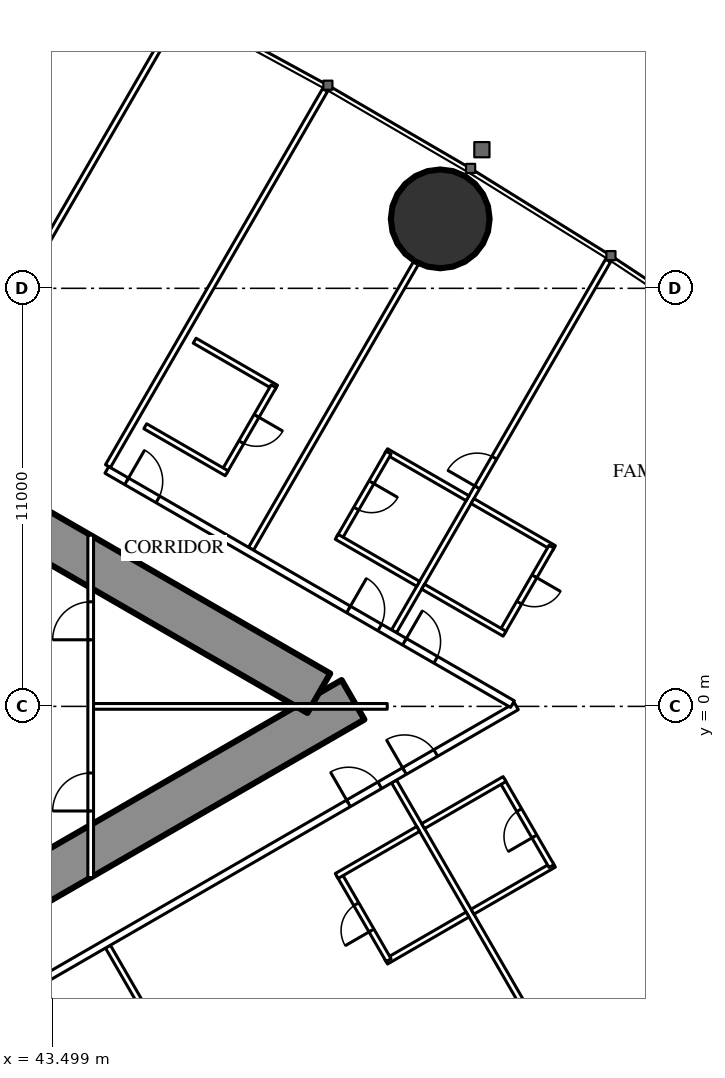
"""IFC4 building model, lengths in metres.
Left out: names, types, materials, properties, quantities, classifications, styles, units other than length and angle.
Written with IfcOpenShell. Run it as: python <this file> out.ifc"""

import sys

from ifc_helpers import new_model, si_unit, direction, frame, frame_2d, origin, origin_2d, place, context, subcontext, project, spatial, rectangle, hollow_circle, extrude, element, fill, save


model = new_model("IFC4")
c1 = context("Model", 3, precision=1e-05, world=origin(), true_north=direction((0.0, 1.0)))
c2 = subcontext(c1, "Body", "Model", "MODEL_VIEW")
j1 = project(units=[si_unit("LENGTHUNIT", "METRE"), si_unit("PLANEANGLEUNIT", "RADIAN")], contexts=[c1])
p1 = place(None, origin())
s1 = spatial("IfcSite", under=j1, at=p1, CompositionType="ELEMENT")
p2 = place(p1, origin())
s2 = spatial("IfcBuilding", under=s1, at=p2, CompositionType="ELEMENT")
p3 = place(p2, frame((0.0, 0.0, 111.6)))
s3 = spatial("IfcBuildingStorey", under=s2, at=p3, CompositionType="ELEMENT", Elevation=111.6)
p4 = place(p3, frame((53.697, 12.827, 0.0), z_axis=(0.0, 0.0, 1.0), x_axis=(1.0, 0.0, 0.0)))
e1 = element("IfcColumn", 1, at=p4, inside=s3, PredefinedType="COLUMN", context=c2, shape_type="SweptSolid", body=[
    extrude(hollow_circle(Radius=1.3, WallThickness=0.1, at=origin_2d()), origin(), (0.0, 0.0, 1.0), 3.5),
])
p5 = place(p3, frame((27.2, -13.8, 0.0), z_axis=(0.0, 0.0, 1.0), x_axis=(0.866027159892, 0.499996958321, 0.0)))
e2 = element("IfcWall", 2, at=p5, inside=s3, PredefinedType="SHEAR", context=c2, shape_type="SweptSolid", body=[
    extrude(rectangle(XDim=27.947, YDim=1.2, at=frame_2d((13.973, 0.0))), origin(), (0.0, 0.0, 1.0), 3.5),
])
p6 = place(p5, frame((4.6, 0.0, 0.0)))
e3 = element("IfcOpeningElement", 3, at=p6, cuts=e2, PredefinedType="OPENING", context=c2, shape_type="SweptSolid", body=[
    extrude(rectangle(XDim=1.0, YDim=2.2, at=frame_2d((0.5, 1.1))), frame((0.0, 0.61, 0.0), z_axis=(0.0, -1.0, 0.0), x_axis=(1.0, 0.0, 0.0)), (0.0, 0.0, 1.0), 1.22),
])
p7 = place(p5, frame((13.395, 0.0, 0.0)))
e4 = element("IfcOpeningElement", 4, at=p7, cuts=e2, PredefinedType="OPENING", context=c2, shape_type="SweptSolid", body=[
    extrude(rectangle(XDim=1.8, YDim=2.2, at=frame_2d((0.9, 1.1))), frame((0.0, 0.61, 0.0), z_axis=(0.0, -1.0, 0.0), x_axis=(1.0, 0.0, 0.0)), (0.0, 0.0, 1.0), 1.22),
])
p8 = place(p3, frame((27.2, 13.8, 0.0), z_axis=(0.0, 0.0, 1.0), x_axis=(0.866024515034, -0.500001539357, 0.0)))
e5 = element("IfcWall", 5, at=p8, inside=s3, PredefinedType="SHEAR", context=c2, shape_type="SweptSolid", body=[
    extrude(rectangle(XDim=26.907, YDim=1.2, at=frame_2d((13.454, 0.0))), origin(), (0.0, 0.0, 1.0), 3.5),
])
p9 = place(p8, frame((4.6, 0.0, 0.0)))
e6 = element("IfcOpeningElement", 6, at=p9, cuts=e5, PredefinedType="OPENING", context=c2, shape_type="SweptSolid", body=[
    extrude(rectangle(XDim=1.0, YDim=2.2, at=frame_2d((0.5, 1.1))), frame((0.0, 0.61, 0.0), z_axis=(0.0, -1.0, 0.0), x_axis=(1.0, 0.0, 0.0)), (0.0, 0.0, 1.0), 1.22),
])
p10 = place(p8, frame((13.395, 0.0, 0.0)))
e7 = element("IfcOpeningElement", 7, at=p10, cuts=e5, PredefinedType="OPENING", context=c2, shape_type="SweptSolid", body=[
    extrude(rectangle(XDim=1.8, YDim=2.2, at=frame_2d((0.9, 1.1))), frame((0.0, 0.61, 0.0), z_axis=(0.0, -1.0, 0.0), x_axis=(1.0, 0.0, 0.0)), (0.0, 0.0, 1.0), 1.22),
])
p11 = place(p3, frame((44.954, -6.321, 0.0), z_axis=(0.0, 0.0, 1.0), x_axis=(0.500018676722, -0.866014620505, 0.0)))
e8 = element("IfcWall", 8, at=p11, inside=s3, PredefinedType="PARTITIONING", context=c2, shape_type="SweptSolid", body=[
    extrude(rectangle(XDim=8.704, YDim=0.15, at=frame_2d((4.352, 0.0))), origin(), (0.0, 0.0, 1.0), 2.2),
])
p12 = place(p3, frame((52.481, -1.975, 0.0), z_axis=(0.0, 0.0, 1.0), x_axis=(0.500003867771, -0.866023170714, 0.0)))
e9 = element("IfcWall", 9, at=p12, inside=s3, PredefinedType="PARTITIONING", context=c2, shape_type="SweptSolid", body=[
    extrude(rectangle(XDim=11.265, YDim=0.15, at=frame_2d((5.632, 0.0))), origin(), (0.0, 0.0, 1.0), 3.25),
])
p13 = place(p3, frame((41.19, 8.494, 0.0), z_axis=(0.0, 0.0, 1.0), x_axis=(0.49999258054, 0.866029687369, 0.0)))
e10 = element("IfcWall", 10, at=p13, inside=s3, PredefinedType="PARTITIONING", context=c2, shape_type="SweptSolid", body=[
    extrude(rectangle(XDim=11.318, YDim=0.15, at=frame_2d((5.659, 0.0))), origin(), (0.0, 0.0, 1.0), 3.25),
])
p14 = place(p3, frame((44.954, 6.321, 0.0), z_axis=(0.0, 0.0, 1.0), x_axis=(0.500009815811, 0.866019736549, 0.0)))
e11 = element("IfcWall", 11, at=p14, inside=s3, PredefinedType="PARTITIONING", context=c2, shape_type="SweptSolid", body=[
    extrude(rectangle(XDim=11.424, YDim=0.15, at=frame_2d((5.712, 0.0))), origin(), (0.0, 0.0, 1.0), 3.25),
])
p15 = place(p3, frame((48.719, 4.147, 0.0), z_axis=(0.0, 0.0, 1.0), x_axis=(0.499993328235, 0.866029255696, 0.0)))
e12 = element("IfcWall", 12, at=p15, inside=s3, PredefinedType="PARTITIONING", context=c2, shape_type="SweptSolid", body=[
    extrude(rectangle(XDim=8.686, YDim=0.15, at=frame_2d((4.343, 0.0))), origin(), (0.0, 0.0, 1.0), 2.2),
])
p16 = place(p3, frame((52.481, 1.975, 0.0), z_axis=(0.0, 0.0, 1.0), x_axis=(0.500003867771, 0.866023170714, 0.0)))
e13 = element("IfcWall", 13, at=p16, inside=s3, PredefinedType="PARTITIONING", context=c2, shape_type="SweptSolid", body=[
    extrude(rectangle(XDim=11.265, YDim=0.15, at=frame_2d((5.632, 0.0))), origin(), (0.0, 0.0, 1.0), 3.25),
])
p17 = place(p16, frame((4.375, 0.0, 0.0)))
e14 = element("IfcOpeningElement", 14, at=p17, cuts=e13, PredefinedType="OPENING", context=c2, shape_type="SweptSolid", body=[
    extrude(rectangle(XDim=0.9, YDim=2.2, at=frame_2d((0.45, 1.1))), frame((0.0, 0.085, 0.0), z_axis=(0.0, -1.0, 0.0), x_axis=(1.0, 0.0, 0.0)), (0.0, 0.0, 1.0), 0.17),
])
p18 = place(p3, frame((37.96, -10.243, 0.0), z_axis=(0.0, 0.0, 1.0), x_axis=(0.866026429433, 0.499998223521, 0.0)))
e15 = element("IfcWall", 15, at=p18, inside=s3, PredefinedType="PARTITIONING", context=c2, shape_type="SweptSolid", body=[
    extrude(rectangle(XDim=20.487, YDim=0.2, at=frame_2d((10.243, 0.0))), origin(), (0.0, 0.0, 1.0), 3.25),
])
p19 = place(p18, frame((4.343, 0.0, 0.0)))
e16 = element("IfcOpeningElement", 16, at=p19, cuts=e15, PredefinedType="OPENING", context=c2, shape_type="SweptSolid", body=[
    extrude(rectangle(XDim=0.95, YDim=2.2, at=frame_2d((0.475, 1.1))), frame((0.0, 0.11, 0.0), z_axis=(0.0, -1.0, 0.0), x_axis=(1.0, 0.0, 0.0)), (0.0, 0.0, 1.0), 0.22),
])
p20 = place(p18, frame((15.385, 0.0, 0.0)))
e17 = element("IfcOpeningElement", 17, at=p20, cuts=e15, PredefinedType="OPENING", context=c2, shape_type="SweptSolid", body=[
    extrude(rectangle(XDim=0.95, YDim=2.2, at=frame_2d((0.475, 1.1))), frame((0.0, 0.11, 0.0), z_axis=(0.0, -1.0, 0.0), x_axis=(1.0, 0.0, 0.0)), (0.0, 0.0, 1.0), 0.22),
])
p21 = place(p18, frame((17.085, 0.0, 0.0)))
e18 = element("IfcOpeningElement", 18, at=p21, cuts=e15, PredefinedType="OPENING", context=c2, shape_type="SweptSolid", body=[
    extrude(rectangle(XDim=0.95, YDim=2.2, at=frame_2d((0.475, 1.1))), frame((0.0, 0.11, 0.0), z_axis=(0.0, -1.0, 0.0), x_axis=(1.0, 0.0, 0.0)), (0.0, 0.0, 1.0), 0.22),
])
p22 = place(p18, frame((1.048, 0.0, 0.0)))
e19 = element("IfcOpeningElement", 19, at=p22, cuts=e15, PredefinedType="OPENING", context=c2, shape_type="SweptSolid", body=[
    extrude(rectangle(XDim=1.8, YDim=2.2, at=frame_2d((0.9, 1.1))), frame((0.0, 0.11, 0.0), z_axis=(0.0, -1.0, 0.0), x_axis=(1.0, 0.0, 0.0)), (0.0, 0.0, 1.0), 0.22),
])
p23 = place(p3, frame((44.925, 6.222, 0.0), z_axis=(0.0, 0.0, 1.0), x_axis=(0.866025590081, -0.499999677325, 0.0)))
e20 = element("IfcWall", 20, at=p23, inside=s3, PredefinedType="PARTITIONING", context=c2, shape_type="SweptSolid", body=[
    extrude(rectangle(XDim=12.324, YDim=0.2, at=frame_2d((6.162, 0.0))), origin(), (0.0, 0.0, 1.0), 3.25),
])
p24 = place(p23, frame((9.042, 0.0, 0.0)))
e21 = element("IfcOpeningElement", 21, at=p24, cuts=e20, PredefinedType="OPENING", context=c2, shape_type="SweptSolid", body=[
    extrude(rectangle(XDim=0.95, YDim=2.2, at=frame_2d((0.475, 1.1))), frame((0.0, 0.11, 0.0), z_axis=(0.0, -1.0, 0.0), x_axis=(1.0, 0.0, 0.0)), (0.0, 0.0, 1.0), 0.22),
])
p25 = place(p23, frame((7.342, 0.0, 0.0)))
e22 = element("IfcOpeningElement", 22, at=p25, cuts=e20, PredefinedType="OPENING", context=c2, shape_type="SweptSolid", body=[
    extrude(rectangle(XDim=0.95, YDim=2.2, at=frame_2d((0.475, 1.1))), frame((0.0, 0.11, 0.0), z_axis=(0.0, -1.0, 0.0), x_axis=(1.0, 0.0, 0.0)), (0.0, 0.0, 1.0), 0.22),
])
p26 = place(p23, frame((0.6, 0.0, 0.0)))
e23 = element("IfcOpeningElement", 23, at=p26, cuts=e20, PredefinedType="OPENING", context=c2, shape_type="SweptSolid", body=[
    extrude(rectangle(XDim=0.95, YDim=2.2, at=frame_2d((0.475, 1.1))), frame((0.0, 0.11, 0.0), z_axis=(0.0, -1.0, 0.0), x_axis=(1.0, 0.0, 0.0)), (0.0, 0.0, 1.0), 0.22),
])
p27 = place(p3, frame((42.81, -7.559, 0.0), z_axis=(0.0, 0.0, 1.0), x_axis=(0.499936506574, -0.866062058628, 0.0)))
e24 = element("IfcWall", 24, at=p27, inside=s3, PredefinedType="PARTITIONING", context=c2, shape_type="SweptSolid", body=[
    extrude(rectangle(XDim=2.6, YDim=0.15, at=frame_2d((1.3, 0.0))), origin(), (0.0, 0.0, 1.0), 3.25),
])
p28 = place(p27, frame((0.9, 0.0, 0.0)))
e25 = element("IfcOpeningElement", 25, at=p28, cuts=e24, PredefinedType="OPENING", context=c2, shape_type="SweptSolid", body=[
    extrude(rectangle(XDim=0.8, YDim=2.2, at=frame_2d((0.4, 1.1))), frame((0.0, 0.085, 0.0), z_axis=(0.0, -1.0, 0.0), x_axis=(1.0, 0.0, 0.0)), (0.0, 0.0, 1.0), 0.17),
])
p29 = place(p3, frame((52.273, -6.714, 0.0), z_axis=(0.0, 0.0, 1.0), x_axis=(0.866031185235, 0.4999899861, 0.0)))
e26 = element("IfcWall", 26, at=p29, inside=s3, PredefinedType="PARTITIONING", context=c2, shape_type="SweptSolid", body=[
    extrude(rectangle(XDim=2.475, YDim=0.15, at=frame_2d((1.238, 0.0))), origin(), (0.0, 0.0, 1.0), 3.25),
])
p30 = place(p3, frame((51.038, -4.425, 0.0), z_axis=(0.0, 0.0, 1.0), x_axis=(0.49997716683, -0.86603858612, 0.0)))
e27 = element("IfcWall", 27, at=p30, inside=s3, PredefinedType="PARTITIONING", context=c2, shape_type="SweptSolid", body=[
    extrude(rectangle(XDim=2.6, YDim=0.15, at=frame_2d((1.3, 0.0))), origin(), (0.0, 0.0, 1.0), 3.25),
])
p31 = place(p30, frame((0.9, 0.0, 0.0)))
e28 = element("IfcOpeningElement", 28, at=p31, cuts=e27, PredefinedType="OPENING", context=c2, shape_type="SweptSolid", body=[
    extrude(rectangle(XDim=0.8, YDim=2.2, at=frame_2d((0.4, 1.1))), frame((0.0, 0.085, 0.0), z_axis=(0.0, -1.0, 0.0), x_axis=(1.0, 0.0, 0.0)), (0.0, 0.0, 1.0), 0.17),
])
p32 = place(p3, frame((50.973, -4.462, 0.0), z_axis=(0.0, 0.0, 1.0), x_axis=(0.866031185235, 0.4999899861, 0.0)))
e29 = element("IfcWall", 29, at=p32, inside=s3, PredefinedType="PARTITIONING", context=c2, shape_type="SweptSolid", body=[
    extrude(rectangle(XDim=2.475, YDim=0.15, at=frame_2d((1.238, 0.0))), origin(), (0.0, 0.0, 1.0), 3.25),
])
p33 = place(p3, frame((54.546, -5.402, 0.0), z_axis=(0.0, 0.0, 1.0), x_axis=(0.866006523861, 0.500032699561, 0.0)))
e30 = element("IfcWall", 30, at=p33, inside=s3, PredefinedType="PARTITIONING", context=c2, shape_type="SweptSolid", body=[
    extrude(rectangle(XDim=2.475, YDim=0.15, at=frame_2d((1.237, 0.0))), origin(), (0.0, 0.0, 1.0), 3.25),
])
p34 = place(p3, frame((55.325, -1.95, 0.0), z_axis=(0.0, 0.0, 1.0), x_axis=(0.500006934395, -0.866021400173, 0.0)))
e31 = element("IfcWall", 31, at=p34, inside=s3, PredefinedType="PARTITIONING", context=c2, shape_type="SweptSolid", body=[
    extrude(rectangle(XDim=2.6, YDim=0.15, at=frame_2d((1.3, 0.0))), origin(), (0.0, 0.0, 1.0), 3.25),
])
p35 = place(p34, frame((0.9, 0.0, 0.0)))
e32 = element("IfcOpeningElement", 32, at=p35, cuts=e31, PredefinedType="OPENING", context=c2, shape_type="SweptSolid", body=[
    extrude(rectangle(XDim=0.8, YDim=2.2, at=frame_2d((0.4, 1.1))), frame((0.0, 0.085, 0.0), z_axis=(0.0, -1.0, 0.0), x_axis=(1.0, 0.0, 0.0)), (0.0, 0.0, 1.0), 0.17),
])
for number, where, z_axis, x_axis in (
    (33, (53.246, -3.15, 0.0), (0.0, 0.0, 1.0), (0.866, 0.5, 0.0)),
    (34, (54.546, 5.402, 0.0), (0.0, 0.0, 1.0), (0.866, -0.5, 0.0)),
):
    element("IfcWall", number, at=place(p3, frame(where, z_axis=z_axis, x_axis=x_axis)), inside=s3, PredefinedType="PARTITIONING", context=c2, shape_type="SweptSolid", body=[
        extrude(rectangle(XDim=2.475, YDim=0.15, at=frame_2d((1.237, 0.0))), origin(), (0.0, 0.0, 1.0), 3.25),
    ])
p36 = place(p3, frame((55.325, 1.95, 0.0), z_axis=(0.0, 0.0, 1.0), x_axis=(0.500006934395, 0.866021400173, 0.0)))
e35 = element("IfcWall", 35, at=p36, inside=s3, PredefinedType="PARTITIONING", context=c2, shape_type="SweptSolid", body=[
    extrude(rectangle(XDim=2.6, YDim=0.15, at=frame_2d((1.3, 0.0))), origin(), (0.0, 0.0, 1.0), 3.25),
])
p37 = place(p36, frame((0.9, 0.0, 0.0)))
e36 = element("IfcOpeningElement", 36, at=p37, cuts=e35, PredefinedType="OPENING", context=c2, shape_type="SweptSolid", body=[
    extrude(rectangle(XDim=0.8, YDim=2.2, at=frame_2d((0.4, 1.1))), frame((0.0, 0.085, 0.0), z_axis=(0.0, -1.0, 0.0), x_axis=(1.0, 0.0, 0.0)), (0.0, 0.0, 1.0), 0.17),
])
p38 = place(p3, frame((53.246, 3.15, 0.0), z_axis=(0.0, 0.0, 1.0), x_axis=(0.866006523861, -0.500032699561, 0.0)))
e37 = element("IfcWall", 37, at=p38, inside=s3, PredefinedType="PARTITIONING", context=c2, shape_type="SweptSolid", body=[
    extrude(rectangle(XDim=2.475, YDim=0.15, at=frame_2d((1.237, 0.0))), origin(), (0.0, 0.0, 1.0), 3.25),
])
p39 = place(p3, frame((52.273, 6.714, 0.0), z_axis=(0.0, 0.0, 1.0), x_axis=(0.866031185235, -0.4999899861, 0.0)))
e38 = element("IfcWall", 38, at=p39, inside=s3, PredefinedType="PARTITIONING", context=c2, shape_type="SweptSolid", body=[
    extrude(rectangle(XDim=2.475, YDim=0.15, at=frame_2d((1.238, 0.0))), origin(), (0.0, 0.0, 1.0), 3.25),
])
p40 = place(p3, frame((51.038, 4.425, 0.0), z_axis=(0.0, 0.0, 1.0), x_axis=(0.49997716683, 0.86603858612, 0.0)))
e39 = element("IfcWall", 39, at=p40, inside=s3, PredefinedType="PARTITIONING", context=c2, shape_type="SweptSolid", body=[
    extrude(rectangle(XDim=2.6, YDim=0.15, at=frame_2d((1.3, 0.0))), origin(), (0.0, 0.0, 1.0), 3.25),
])
p41 = place(p40, frame((0.9, 0.0, 0.0)))
e40 = element("IfcOpeningElement", 40, at=p41, cuts=e39, PredefinedType="OPENING", context=c2, shape_type="SweptSolid", body=[
    extrude(rectangle(XDim=0.8, YDim=2.2, at=frame_2d((0.4, 1.1))), frame((0.0, 0.085, 0.0), z_axis=(0.0, -1.0, 0.0), x_axis=(1.0, 0.0, 0.0)), (0.0, 0.0, 1.0), 0.17),
])
p42 = place(p3, frame((50.973, 4.462, 0.0), z_axis=(0.0, 0.0, 1.0), x_axis=(0.866031185235, -0.4999899861, 0.0)))
e41 = element("IfcWall", 41, at=p42, inside=s3, PredefinedType="PARTITIONING", context=c2, shape_type="SweptSolid", body=[
    extrude(rectangle(XDim=2.475, YDim=0.15, at=frame_2d((1.238, 0.0))), origin(), (0.0, 0.0, 1.0), 3.25),
])
p43 = place(p3, frame((47.235, 9.623, 0.0), z_axis=(0.0, 0.0, 1.0), x_axis=(0.866006523861, -0.500032699561, 0.0)))
e42 = element("IfcWall", 42, at=p43, inside=s3, PredefinedType="PARTITIONING", context=c2, shape_type="SweptSolid", body=[
    extrude(rectangle(XDim=2.475, YDim=0.15, at=frame_2d((1.237, 0.0))), origin(), (0.0, 0.0, 1.0), 3.25),
])
p44 = place(p3, frame((48.013, 6.171, 0.0), z_axis=(0.0, 0.0, 1.0), x_axis=(0.500006934395, 0.866021400173, 0.0)))
e43 = element("IfcWall", 43, at=p44, inside=s3, PredefinedType="PARTITIONING", context=c2, shape_type="SweptSolid", body=[
    extrude(rectangle(XDim=2.6, YDim=0.15, at=frame_2d((1.3, 0.0))), origin(), (0.0, 0.0, 1.0), 3.25),
])
p45 = place(p44, frame((0.9, 0.0, 0.0)))
e44 = element("IfcOpeningElement", 44, at=p45, cuts=e43, PredefinedType="OPENING", context=c2, shape_type="SweptSolid", body=[
    extrude(rectangle(XDim=0.8, YDim=2.2, at=frame_2d((0.4, 1.1))), frame((0.0, 0.085, 0.0), z_axis=(0.0, -1.0, 0.0), x_axis=(1.0, 0.0, 0.0)), (0.0, 0.0, 1.0), 0.17),
])
p46 = place(p3, frame((45.935, 7.371, 0.0), z_axis=(0.0, 0.0, 1.0), x_axis=(0.866031185235, -0.4999899861, 0.0)))
e45 = element("IfcWall", 45, at=p46, inside=s3, PredefinedType="PARTITIONING", context=c2, shape_type="SweptSolid", body=[
    extrude(rectangle(XDim=2.475, YDim=0.15, at=frame_2d((1.238, 0.0))), origin(), (0.0, 0.0, 1.0), 3.25),
])
p47 = place(p3, frame((44.5, -4.505, 0.0), z_axis=(0.0, 0.0, 1.0), x_axis=(0.0, 1.0, 0.0)))
e46 = element("IfcWall", 46, at=p47, inside=s3, PredefinedType="PARTITIONING", context=c2, shape_type="SweptSolid", body=[
    extrude(rectangle(XDim=9.009, YDim=0.15, at=frame_2d((4.505, 0.0))), origin(), (0.0, 0.0, 1.0), 2.45),
])
p48 = place(p47, frame((1.752, 0.0, 0.0)))
e47 = element("IfcOpeningElement", 47, at=p48, cuts=e46, PredefinedType="OPENING", context=c2, shape_type="SweptSolid", body=[
    extrude(rectangle(XDim=1.0, YDim=2.2, at=frame_2d((0.5, 1.1))), frame((0.0, 0.085, 0.0), z_axis=(0.0, -1.0, 0.0), x_axis=(1.0, 0.0, 0.0)), (0.0, 0.0, 1.0), 0.17),
])
p49 = place(p47, frame((6.257, 0.0, 0.0)))
e48 = element("IfcOpeningElement", 48, at=p49, cuts=e46, PredefinedType="OPENING", context=c2, shape_type="SweptSolid", body=[
    extrude(rectangle(XDim=1.0, YDim=2.2, at=frame_2d((0.5, 1.1))), frame((0.0, 0.085, 0.0), z_axis=(0.0, -1.0, 0.0), x_axis=(1.0, 0.0, 0.0)), (0.0, 0.0, 1.0), 0.17),
])
p50 = place(p3, frame((44.575, 0.0, 0.0), z_axis=(0.0, 0.0, 1.0), x_axis=(1.0, 0.0, 0.0)))
e49 = element("IfcWall", 49, at=p50, inside=s3, PredefinedType="PARTITIONING", context=c2, shape_type="SweptSolid", body=[
    extrude(rectangle(XDim=7.727, YDim=0.15, at=frame_2d((3.864, 0.0))), origin(), (0.0, 0.0, 1.0), 2.2),
])
p51 = place(p31, origin())
e50 = element("IfcDoor", 50, at=p51, inside=s3, OperationType="SINGLE_SWING_RIGHT", PredefinedType="DOOR", context=c2, shape_type="SweptSolid", body=[
    extrude(rectangle(XDim=0.8, YDim=2.2, at=frame_2d((0.4, 1.1))), frame((0.0, 0.025, 0.0), z_axis=(0.0, -1.0, 0.0), x_axis=(1.0, 0.0, 0.0)), (0.0, 0.0, 1.0), 0.05),
])
fill(e28, e50)
p52 = place(p20, origin())
e51 = element("IfcDoor", 51, at=p52, inside=s3, OperationType="SINGLE_SWING_LEFT", PredefinedType="DOOR", context=c2, shape_type="SweptSolid", body=[
    extrude(rectangle(XDim=0.95, YDim=2.2, at=frame_2d((0.475, 1.1))), frame((0.0, 0.025, 0.0), z_axis=(0.0, -1.0, 0.0), x_axis=(1.0, 0.0, 0.0)), (0.0, 0.0, 1.0), 0.05),
])
fill(e17, e51)
p53 = place(p35, origin())
e52 = element("IfcDoor", 52, at=p53, inside=s3, OperationType="SINGLE_SWING_RIGHT", PredefinedType="DOOR", context=c2, shape_type="SweptSolid", body=[
    extrude(rectangle(XDim=0.8, YDim=2.2, at=frame_2d((0.4, 1.1))), frame((0.0, 0.025, 0.0), z_axis=(0.0, -1.0, 0.0), x_axis=(1.0, 0.0, 0.0)), (0.0, 0.0, 1.0), 0.05),
])
fill(e32, e52)
p54 = place(p21, origin())
e53 = element("IfcDoor", 53, at=p54, inside=s3, OperationType="SINGLE_SWING_LEFT", PredefinedType="DOOR", context=c2, shape_type="SweptSolid", body=[
    extrude(rectangle(XDim=0.95, YDim=2.2, at=frame_2d((0.475, 1.1))), frame((0.0, 0.025, 0.0), z_axis=(0.0, -1.0, 0.0), x_axis=(1.0, 0.0, 0.0)), (0.0, 0.0, 1.0), 0.05),
])
fill(e18, e53)
p55 = place(p37, origin())
e54 = element("IfcDoor", 54, at=p55, inside=s3, OperationType="SINGLE_SWING_RIGHT", PredefinedType="DOOR", context=c2, shape_type="SweptSolid", body=[
    extrude(rectangle(XDim=0.8, YDim=2.2, at=frame_2d((0.4, 1.1))), frame((0.0, 0.025, 0.0), z_axis=(0.0, -1.0, 0.0), x_axis=(1.0, 0.0, 0.0)), (0.0, 0.0, 1.0), 0.05),
])
fill(e36, e54)
p56 = place(p24, origin())
e55 = element("IfcDoor", 55, at=p56, inside=s3, OperationType="SINGLE_SWING_LEFT", PredefinedType="DOOR", context=c2, shape_type="SweptSolid", body=[
    extrude(rectangle(XDim=0.95, YDim=2.2, at=frame_2d((0.475, 1.1))), frame((0.0, 0.025, 0.0), z_axis=(0.0, -1.0, 0.0), x_axis=(1.0, 0.0, 0.0)), (0.0, 0.0, 1.0), 0.05),
])
fill(e21, e55)
p57 = place(p41, origin())
e56 = element("IfcDoor", 56, at=p57, inside=s3, OperationType="SINGLE_SWING_RIGHT", PredefinedType="DOOR", context=c2, shape_type="SweptSolid", body=[
    extrude(rectangle(XDim=0.8, YDim=2.2, at=frame_2d((0.4, 1.1))), frame((0.0, 0.025, 0.0), z_axis=(0.0, -1.0, 0.0), x_axis=(1.0, 0.0, 0.0)), (0.0, 0.0, 1.0), 0.05),
])
fill(e40, e56)
p58 = place(p25, origin())
e57 = element("IfcDoor", 57, at=p58, inside=s3, OperationType="SINGLE_SWING_LEFT", PredefinedType="DOOR", context=c2, shape_type="SweptSolid", body=[
    extrude(rectangle(XDim=0.95, YDim=2.2, at=frame_2d((0.475, 1.1))), frame((0.0, 0.025, 0.0), z_axis=(0.0, -1.0, 0.0), x_axis=(1.0, 0.0, 0.0)), (0.0, 0.0, 1.0), 0.05),
])
fill(e22, e57)
p59 = place(p45, origin())
e58 = element("IfcDoor", 58, at=p59, inside=s3, OperationType="SINGLE_SWING_RIGHT", PredefinedType="DOOR", context=c2, shape_type="SweptSolid", body=[
    extrude(rectangle(XDim=0.8, YDim=2.2, at=frame_2d((0.4, 1.1))), frame((0.0, 0.025, 0.0), z_axis=(0.0, -1.0, 0.0), x_axis=(1.0, 0.0, 0.0)), (0.0, 0.0, 1.0), 0.05),
])
fill(e44, e58)
p60 = place(p26, origin())
e59 = element("IfcDoor", 59, at=p60, inside=s3, OperationType="SINGLE_SWING_LEFT", PredefinedType="DOOR", context=c2, shape_type="SweptSolid", body=[
    extrude(rectangle(XDim=0.95, YDim=2.2, at=frame_2d((0.475, 1.1))), frame((0.0, 0.025, 0.0), z_axis=(0.0, -1.0, 0.0), x_axis=(1.0, 0.0, 0.0)), (0.0, 0.0, 1.0), 0.05),
])
fill(e23, e59)
p61 = place(p17, origin())
e60 = element("IfcDoor", 60, at=p61, inside=s3, OperationType="SINGLE_SWING_LEFT", PredefinedType="DOOR", context=c2, shape_type="SweptSolid", body=[
    extrude(rectangle(XDim=0.9, YDim=2.2, at=frame_2d((0.45, 1.1))), frame((0.0, 0.025, 0.0), z_axis=(0.0, -1.0, 0.0), x_axis=(1.0, 0.0, 0.0)), (0.0, 0.0, 1.0), 0.05),
])
fill(e14, e60)
p62 = place(p48, origin())
e61 = element("IfcDoor", 61, at=p62, inside=s3, OperationType="SINGLE_SWING_LEFT", PredefinedType="DOOR", context=c2, shape_type="SweptSolid", body=[
    extrude(rectangle(XDim=1.0, YDim=2.2, at=frame_2d((0.5, 1.1))), frame((0.0, 0.025, 0.0), z_axis=(0.0, -1.0, 0.0), x_axis=(1.0, 0.0, 0.0)), (0.0, 0.0, 1.0), 0.05),
])
fill(e47, e61)
p63 = place(p49, origin())
e62 = element("IfcDoor", 62, at=p63, inside=s3, OperationType="SINGLE_SWING_LEFT", PredefinedType="DOOR", context=c2, shape_type="SweptSolid", body=[
    extrude(rectangle(XDim=1.0, YDim=2.2, at=frame_2d((0.5, 1.1))), frame((0.0, 0.025, 0.0), z_axis=(0.0, -1.0, 0.0), x_axis=(1.0, 0.0, 0.0)), (0.0, 0.0, 1.0), 0.05),
])
fill(e48, e62)
save(model, sys.argv[1])
